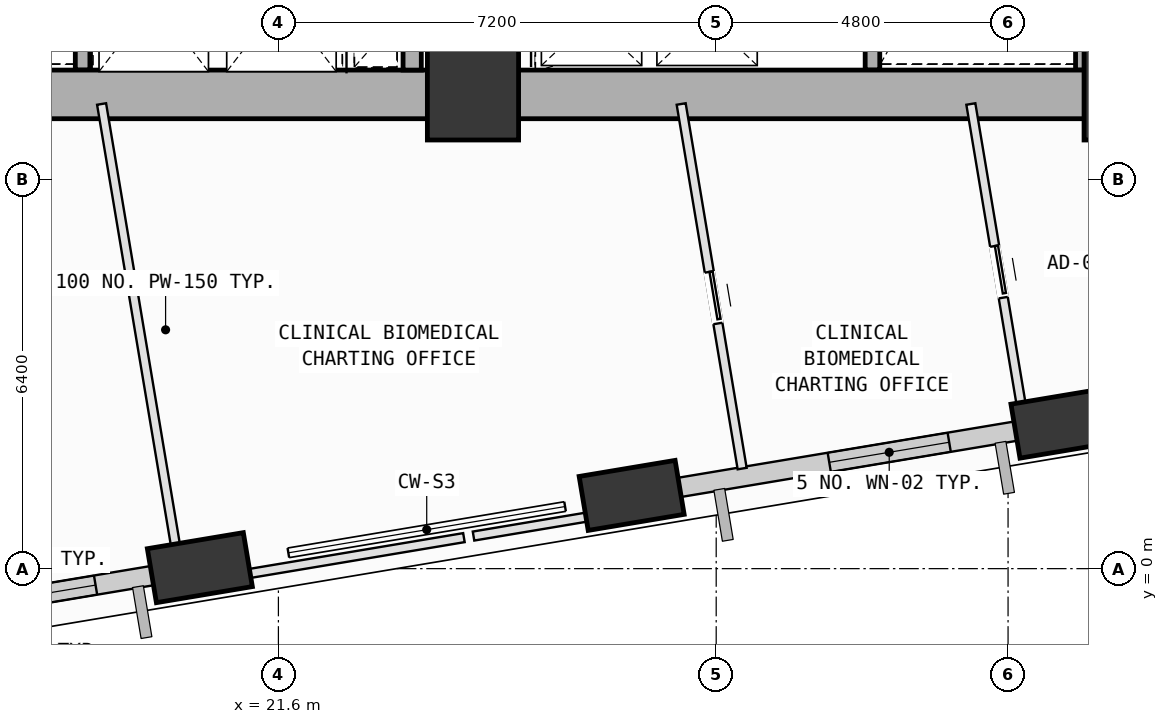
"""IFC4 building model, lengths in metres.
Left out: names, types, materials, properties, quantities, classifications, styles, units other than length and angle.
Written with IfcOpenShell. Run it as: python <this file> out.ifc"""

import sys

from ifc_helpers import new_model, si_unit, direction, frame, frame_2d, origin, origin_2d, place, context, subcontext, project, spatial, rectangle, extrude, element, fill, save


model = new_model("IFC4")
c1 = context("Model", 3, precision=1e-05, world=origin(), true_north=direction((0.0, 1.0)))
c2 = subcontext(c1, "Body", "Model", "MODEL_VIEW")
j1 = project(units=[si_unit("LENGTHUNIT", "METRE"), si_unit("PLANEANGLEUNIT", "RADIAN")], contexts=[c1])
p1 = place(None, origin())
s1 = spatial("IfcSite", under=j1, at=p1, CompositionType="ELEMENT")
p2 = place(p1, origin())
s2 = spatial("IfcBuilding", under=s1, at=p2, CompositionType="ELEMENT")
p3 = place(p2, frame((0.0, 0.0, 63.0)))
s3 = spatial("IfcBuildingStorey", under=s2, at=p3, CompositionType="ELEMENT", Elevation=63.0)
for number, where, z_axis, x_axis in (
    (1, (24.8, 7.8, 0.0), (0.0, 0.0, 1.0), (1.0, 0.0, 0.0)),
    (2, (35.6, 7.8, 0.0), (0.0, 0.0, 1.0), (1.0, 0.0, 0.0)),
):
    element("IfcColumn", number, at=place(p3, frame(where, z_axis=z_axis, x_axis=x_axis)), inside=s3, PredefinedType="COLUMN", context=c2, shape_type="SweptSolid", body=[
        extrude(rectangle(XDim=1.5, YDim=1.5, at=origin_2d()), origin(), (0.0, 0.0, 1.0), 4.0),
    ])
p4 = place(p3, frame((20.308, 0.016, 0.002), z_axis=(0.102482960612, -0.053820240416, 0.993277717713), x_axis=(0.313429699952, 0.949419198593, 0.019105196453)))
e3 = element("IfcColumn", 3, at=p4, inside=s3, PredefinedType="COLUMN", context=c2, shape_type="SweptSolid", body=[
    extrude(rectangle(XDim=1.6, YDim=0.9, at=origin_2d()), origin(), (0.0, 0.0, 1.0), 4.024),
])
p5 = place(p3, frame((27.41, 1.205, 0.002), z_axis=(0.097487270528, -0.024736483233, 0.994929313309), x_axis=(0.083406880372, 0.996377305283, 0.016599934461)))
e4 = element("IfcColumn", 4, at=p5, inside=s3, PredefinedType="COLUMN", context=c2, shape_type="SweptSolid", body=[
    extrude(rectangle(XDim=1.6, YDim=0.9, at=origin_2d()), origin(), (0.0, 0.0, 1.0), 4.017),
])
p6 = place(p3, frame((34.511, 2.393, 0.002), z_axis=(0.092393835474, 0.004501082176, 0.995712367818), x_axis=(-0.212136509063, 0.977120773498, 0.015267466098)))
e5 = element("IfcColumn", 5, at=p6, inside=s3, PredefinedType="COLUMN", context=c2, shape_type="SweptSolid", body=[
    extrude(rectangle(XDim=1.6, YDim=0.9, at=origin_2d()), origin(), (0.0, 0.0, 1.0), 4.014),
])
p7 = place(p3, frame((19.908, -0.051, 0.0), z_axis=(0.0, 0.0, 1.0), x_axis=(-0.986283266612, -0.165061558217, 0.0)))
e6 = element("IfcWall", 6, at=p7, inside=s3, PredefinedType="SOLIDWALL", context=c2, shape_type="SweptSolid", body=[
    extrude(rectangle(XDim=6.035, YDim=0.32, at=frame_2d((3.017, 0.0))), origin(), (0.0, 0.0, 1.0), 3.165),
])
p8 = place(p7, frame((1.333, 0.0, 0.75)))
e7 = element("IfcOpeningElement", 7, at=p8, cuts=e6, PredefinedType="OPENING", context=c2, shape_type="SweptSolid", body=[
    extrude(rectangle(XDim=1.6, YDim=1.95, at=frame_2d((0.8, 0.975))), frame((0.0, 0.17, 0.0), z_axis=(0.0, -1.0, 0.0), x_axis=(1.0, 0.0, 0.0)), (0.0, 0.0, 1.0), 0.34),
])
p9 = place(p3, frame((34.094, 2.323, 0.0), z_axis=(0.0, 0.0, 1.0), x_axis=(-0.986286856303, -0.1650401075, 0.0)))
e8 = element("IfcWall", 8, at=p9, inside=s3, PredefinedType="SOLIDWALL", context=c2, shape_type="SweptSolid", body=[
    extrude(rectangle(XDim=5.99, YDim=0.32, at=frame_2d((2.995, 0.0))), origin(), (0.0, 0.0, 1.0), 3.165),
])
p10 = place(p9, frame((1.482, 0.0, 0.75)))
e9 = element("IfcOpeningElement", 9, at=p10, cuts=e8, PredefinedType="OPENING", context=c2, shape_type="SweptSolid", body=[
    extrude(rectangle(XDim=2.0, YDim=1.95, at=frame_2d((1.0, 0.975))), frame((0.0, 0.17, 0.0), z_axis=(0.0, -1.0, 0.0), x_axis=(1.0, 0.0, 0.0)), (0.0, 0.0, 1.0), 0.34),
])
for number, where, z_axis, x_axis in (
    (10, (18.38, 15.12, 0.0), (0.0, 0.0, 1.0), (0.0, -1.0, 0.0)),
    (11, (34.83, 15.12, 0.0), (0.0, 0.0, 1.0), (0.0, -1.0, 0.0)),
    (12, (31.37, 8.2, 0.0), (0.0, 0.0, 1.0), (0.0, 1.0, 0.0)),
):
    element("IfcWall", number, at=place(p3, frame(where, z_axis=z_axis, x_axis=x_axis)), inside=s3, PredefinedType="SOLIDWALL", context=c2, shape_type="SweptSolid", body=[
        extrude(rectangle(XDim=6.92, YDim=0.24, at=frame_2d((3.46, 0.0))), origin(), (0.0, 0.0, 1.0), 3.78),
    ])
for number, where, z_axis, x_axis in (
    (13, (14.0, 7.8, 0.0), (0.0, 0.0, 1.0), (1.0, 0.0, 0.0)),
    (14, (24.8, 7.8, 0.0), (0.0, 0.0, 1.0), (1.0, 0.0, 0.0)),
):
    element("IfcWall", number, at=place(p3, frame(where, z_axis=z_axis, x_axis=x_axis)), inside=s3, PredefinedType="SHEAR", context=c2, shape_type="SweptSolid", body=[
        extrude(rectangle(XDim=10.8, YDim=0.8, at=frame_2d((5.4, 0.0))), origin(), (0.0, 0.0, 1.0), 3.78),
    ])
p11 = place(p3, frame((23.8, 8.2, 0.0), z_axis=(0.0, 0.0, 1.0), x_axis=(0.0, 1.0, 0.0)))
e15 = element("IfcWall", 15, at=p11, inside=s3, PredefinedType="SOLIDWALL", context=c2, shape_type="SweptSolid", body=[
    extrude(rectangle(XDim=2.48, YDim=0.3, at=frame_2d((1.24, 0.0))), origin(), (0.0, 0.0, 1.0), 3.78),
])
p12 = place(p3, frame((18.692, 7.642, 0.0), z_axis=(0.0, 0.0, 1.0), x_axis=(0.165126417203, -0.986272409805, 0.0)))
e16 = element("IfcWall", 16, at=p12, inside=s3, PredefinedType="PARTITIONING", context=c2, shape_type="SweptSolid", body=[
    extrude(rectangle(XDim=7.673, YDim=0.15, at=frame_2d((3.837, 0.0))), origin(), (0.0, 0.0, 1.0), 3.78),
])
p13 = place(p3, frame((24.651, 0.51, 0.0), z_axis=(0.0, 0.0, 1.0), x_axis=(-0.986290516722, -0.165018231188, 0.0)))
e17 = element("IfcWall", 17, at=p13, inside=s3, PredefinedType="PARTITIONING", context=c2, shape_type="SweptSolid", body=[
    extrude(rectangle(XDim=4.539, YDim=0.15, at=frame_2d((2.27, 0.0))), origin(), (0.0, 0.0, 1.0), 3.165),
])
p14 = place(p3, frame((28.224, 1.108, 0.0), z_axis=(0.0, 0.0, 1.0), x_axis=(-0.986260206386, -0.165199289646, 0.0)))
e18 = element("IfcWall", 18, at=p14, inside=s3, PredefinedType="PARTITIONING", context=c2, shape_type="SweptSolid", body=[
    extrude(rectangle(XDim=3.463, YDim=0.15, at=frame_2d((1.731, 0.0))), origin(), (0.0, 0.0, 1.0), 3.165),
])
p15 = place(p3, frame((28.224, 7.642, 0.0), z_axis=(0.0, 0.0, 1.0), x_axis=(0.164972035395, -0.98629824472, 0.0)))
e19 = element("IfcWall", 19, at=p15, inside=s3, PredefinedType="PARTITIONING", context=c2, shape_type="SweptSolid", body=[
    extrude(rectangle(XDim=6.079, YDim=0.15, at=frame_2d((3.04, 0.0))), origin(), (0.0, 0.0, 1.0), 3.78),
])
p16 = place(p15, frame((2.8, 0.0, 0.0)))
e20 = element("IfcOpeningElement", 20, at=p16, cuts=e19, PredefinedType="OPENING", context=c2, shape_type="SweptSolid", body=[
    extrude(rectangle(XDim=0.86, YDim=2.06, at=frame_2d((0.43, 1.03))), frame((0.0, 0.085, 0.0), z_axis=(0.0, -1.0, 0.0), x_axis=(1.0, 0.0, 0.0)), (0.0, 0.0, 1.0), 0.17),
])
p17 = place(p3, frame((32.988, 7.642, 0.0), z_axis=(0.0, 0.0, 1.0), x_axis=(0.165101931281, -0.986276509042, 0.0)))
e21 = element("IfcWall", 21, at=p17, inside=s3, PredefinedType="PARTITIONING", context=c2, shape_type="SweptSolid", body=[
    extrude(rectangle(XDim=5.294, YDim=0.15, at=frame_2d((2.647, 0.0))), origin(), (0.0, 0.0, 1.0), 3.78),
])
p18 = place(p17, frame((2.369, 0.0, 0.0)))
e22 = element("IfcOpeningElement", 22, at=p18, cuts=e21, PredefinedType="OPENING", context=c2, shape_type="SweptSolid", body=[
    extrude(rectangle(XDim=0.86, YDim=2.06, at=frame_2d((0.43, 1.03))), frame((0.0, 0.085, 0.0), z_axis=(0.0, -1.0, 0.0), x_axis=(1.0, 0.0, 0.0)), (0.0, 0.0, 1.0), 0.17),
])
p19 = place(p3, frame((35.33, 2.297, 0.0), z_axis=(0.0, 0.0, 1.0), x_axis=(-0.986323210035, -0.16482270883, 0.0)))
e23 = element("IfcWall", 23, at=p19, inside=s3, PredefinedType="PARTITIONING", context=c2, shape_type="SweptSolid", body=[
    extrude(rectangle(XDim=1.215, YDim=0.15, at=frame_2d((0.607, 0.0))), origin(), (0.0, 0.0, 1.0), 3.165),
])
p20 = place(p8, origin())
e24 = element("IfcWindow", 24, at=p20, inside=s3, PartitioningType="SINGLE_PANEL", PredefinedType="WINDOW", context=c2, shape_type="SweptSolid", body=[
    extrude(rectangle(XDim=1.6, YDim=1.95, at=frame_2d((0.8, 0.975))), frame((0.0, 0.03, 0.0), z_axis=(0.0, -1.0, 0.0), x_axis=(1.0, 0.0, 0.0)), (0.0, 0.0, 1.0), 0.06),
])
fill(e7, e24)
p21 = place(p10, origin())
e25 = element("IfcWindow", 25, at=p21, inside=s3, PartitioningType="SINGLE_PANEL", PredefinedType="WINDOW", context=c2, shape_type="SweptSolid", body=[
    extrude(rectangle(XDim=2.0, YDim=1.95, at=frame_2d((1.0, 0.975))), frame((0.0, 0.03, 0.0), z_axis=(0.0, -1.0, 0.0), x_axis=(1.0, 0.0, 0.0)), (0.0, 0.0, 1.0), 0.06),
])
fill(e9, e25)
p22 = place(p18, origin())
e26 = element("IfcDoor", 26, at=p22, inside=s3, OperationType="SLIDING_TO_LEFT", PredefinedType="DOOR", context=c2, shape_type="SweptSolid", body=[
    extrude(rectangle(XDim=0.86, YDim=2.06, at=frame_2d((0.43, 1.03))), frame((0.0, 0.025, 0.0), z_axis=(0.0, -1.0, 0.0), x_axis=(1.0, 0.0, 0.0)), (0.0, 0.0, 1.0), 0.05),
])
fill(e22, e26)
p23 = place(p16, origin())
e27 = element("IfcDoor", 27, at=p23, inside=s3, OperationType="SLIDING_TO_LEFT", PredefinedType="DOOR", context=c2, shape_type="SweptSolid", body=[
    extrude(rectangle(XDim=0.86, YDim=2.06, at=frame_2d((0.43, 1.03))), frame((0.0, 0.025, 0.0), z_axis=(0.0, -1.0, 0.0), x_axis=(1.0, 0.0, 0.0)), (0.0, 0.0, 1.0), 0.05),
])
fill(e20, e27)
save(model, sys.argv[1])
